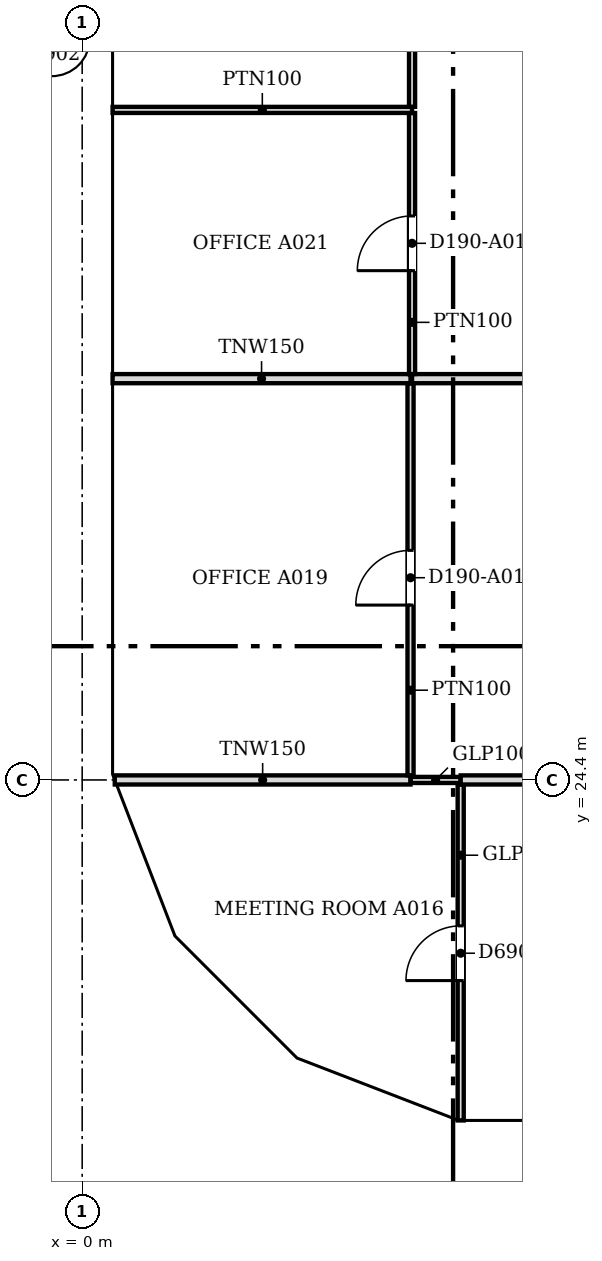
"""IFC4 building model, lengths in metres.
Left out: names, types, materials, properties, quantities, classifications, styles, units other than length and angle.
Written with IfcOpenShell. Run it as: python <this file> out.ifc"""

import sys

from ifc_helpers import new_model, si_unit, direction, frame, frame_2d, origin, place, context, subcontext, project, spatial, polyline, rectangle, outline, extrude, faceted_brep, source, transform, mapped, element, fill, save


model = new_model("IFC4")
c1 = context("Model", 3, precision=1e-05, world=origin(), true_north=direction((0.0, 1.0)))
c2 = subcontext(c1, "Body", "Model", "MODEL_VIEW")
j1 = project(units=[si_unit("LENGTHUNIT", "METRE"), si_unit("PLANEANGLEUNIT", "RADIAN")], contexts=[c1])
p1 = place(None, origin())
s1 = spatial("IfcSite", under=j1, at=p1, CompositionType="ELEMENT")
p2 = place(p1, origin())
s2 = spatial("IfcBuilding", under=s1, at=p2, CompositionType="ELEMENT")
p3 = place(p2, frame((0.0, 0.0, 21.3)))
s3 = spatial("IfcBuildingStorey", under=s2, at=p3, CompositionType="ELEMENT", Elevation=21.3)
m1 = source(origin(), c2, "Body", "Brep", [
    faceted_brep([(3.05, -0.25, 0.0), (6.1, -0.25, 4.5), (6.1, -0.25, 4.5), (3.05, -0.25, 9.0), (0.0, -0.25, 4.5), (0.0, 0.25, 4.5), (3.05, 0.25, 9.0), (6.1, 0.25, 4.5), (6.1, 0.25, 4.5), (3.05, 0.25, 0.0)], [[[0, 1, 2, 3, 4]], [[5, 6, 7, 8, 9]], [[9, 8, 1, 0]], [[7, 6, 3, 2]], [[6, 5, 4, 3]], [[5, 9, 0, 4]], [[1, 8, 7, 2]]]),
])
p4 = place(p3, frame((0.25, 39.65, -4.5), z_axis=(0.0, 0.0, 1.0), x_axis=(0.0, -1.0, 0.0)))
e1 = element("IfcWall", 1, at=p4, inside=s3, PredefinedType="SOLIDWALL", context=c2, shape_type="MappedRepresentation", body=[
    mapped(m1, transform((0.0, 0.0, 0.0), scale=1.0)),
])
m2 = source(origin(), c2, "Body", "SweptSolid", [
    extrude(outline(polyline([(3.05, 0.446), (5.798, 4.5), (3.05, 8.554), (0.302, 4.5), (3.05, 0.446)])), frame((0.0, 0.26, 0.0), z_axis=(0.0, -1.0, 0.0), x_axis=(1.0, 0.0, 0.0)), (0.0, 0.0, 1.0), 0.52),
])
p5 = place(p4, origin())
e2 = element("IfcOpeningElement", 2, at=p5, cuts=e1, PredefinedType="OPENING", context=c2, shape_type="MappedRepresentation", body=[
    mapped(m2, transform((0.0, 0.0, 0.0), scale=1.0)),
])
m3 = source(origin(), c2, "Body", "SweptSolid", [
    extrude(outline(polyline([(3.05, 0.0), (6.1, 4.5), (3.05, 9.0), (0.0, 4.5), (3.05, 0.0)])), frame((0.0, 0.25, 0.0), z_axis=(0.0, -1.0, 0.0), x_axis=(1.0, 0.0, 0.0)), (0.0, 0.0, 1.0), 0.5),
])
p6 = place(p3, frame((0.25, 33.55, -4.5), z_axis=(0.0, 0.0, 1.0), x_axis=(0.0, -1.0, 0.0)))
e3 = element("IfcWall", 3, at=p6, inside=s3, PredefinedType="SOLIDWALL", context=c2, shape_type="MappedRepresentation", body=[
    mapped(m3, transform((0.0, 0.0, 0.0), scale=1.0)),
])
p7 = place(p6, origin())
e4 = element("IfcOpeningElement", 4, at=p7, cuts=e3, PredefinedType="OPENING", context=c2, shape_type="MappedRepresentation", body=[
    mapped(m2, transform((0.0, 0.0, 0.0), scale=1.0)),
])
m4 = source(origin(), c2, "Body", "Brep", [
    faceted_brep([(3.003, -0.25, 0.0), (3.05, -0.25, 0.071), (3.05, -0.25, 8.929), (3.003, -0.25, 9.0), (0.0, -0.25, 4.5), (0.0, 0.25, 4.5), (2.957, 0.25, 8.93), (2.957, 0.25, 0.07), (3.003, 0.0, 0.0), (3.003, 0.0, 9.0)], [[[0, 1, 2, 3, 4]], [[5, 6, 7]], [[1, 0, 8]], [[9, 3, 2]], [[6, 5, 4, 3, 9]], [[5, 7, 8, 0, 4]], [[1, 8, 7, 6, 9, 2]]]),
])
p8 = place(p3, frame((0.25, 27.45, -4.5), z_axis=(0.0, 0.0, 1.0), x_axis=(0.0, -1.0, 0.0)))
e5 = element("IfcWall", 5, at=p8, inside=s3, PredefinedType="SOLIDWALL", context=c2, shape_type="MappedRepresentation", body=[
    mapped(m4, transform((0.0, 0.0, 0.0), scale=1.0)),
])
m5 = source(origin(), c2, "Body", "SweptSolid", [
    extrude(outline(polyline([(2.803, 8.25), (0.301, 4.5), (2.803, 0.75), (2.803, 8.25)])), frame((0.0, 0.26, 0.0), z_axis=(0.0, -1.0, 0.0), x_axis=(1.0, 0.0, 0.0)), (0.0, 0.0, 1.0), 0.52),
])
p9 = place(p8, origin())
e6 = element("IfcOpeningElement", 6, at=p9, cuts=e5, PredefinedType="OPENING", context=c2, shape_type="MappedRepresentation", body=[
    mapped(m5, transform((0.0, 0.0, 0.0), scale=1.0)),
])
m6 = source(origin(), c2, "Body", "Brep", [
    faceted_brep([(0.047, -0.25, 0.0), (2.997, -0.25, 4.5), (0.047, -0.25, 9.0), (0.0, -0.25, 8.93), (0.0, -0.25, 0.07), (0.093, 0.25, 8.929), (2.944, 0.25, 4.581), (2.944, 0.25, 4.419), (0.093, 0.25, 0.071), (2.997, 0.0, 4.5), (0.047, 0.0, 0.0), (0.047, 0.0, 9.0)], [[[0, 1, 2, 3, 4]], [[5, 6, 7, 8]], [[8, 7, 9, 1, 0, 10]], [[6, 5, 11, 2, 1, 9]], [[3, 2, 11]], [[10, 0, 4]], [[8, 10, 4, 3, 11, 5]], [[9, 7, 6]]]),
])
p10 = place(p3, frame((0.233, 24.49, -4.5), z_axis=(0.0, 0.0, 1.0), x_axis=(0.359901446078, -0.932990326376, 0.0)))
e7 = element("IfcWall", 7, at=p10, inside=s3, PredefinedType="SOLIDWALL", context=c2, shape_type="MappedRepresentation", body=[
    mapped(m6, transform((0.0, 0.0, 0.0), scale=1.0)),
])
m7 = source(origin(), c2, "Body", "SweptSolid", [
    extrude(outline(polyline([(0.247, 0.761), (2.698, 4.5), (0.247, 8.239), (0.247, 0.761)])), frame((0.0, 0.26, 0.0), z_axis=(0.0, -1.0, 0.0), x_axis=(1.0, 0.0, 0.0)), (0.0, 0.0, 1.0), 0.52),
])
p11 = place(p10, origin())
e8 = element("IfcOpeningElement", 8, at=p11, cuts=e7, PredefinedType="OPENING", context=c2, shape_type="MappedRepresentation", body=[
    mapped(m7, transform((0.0, 0.0, 0.0), scale=1.0)),
])
m8 = source(origin(), c2, "Body", "Brep", [
    faceted_brep([(2.944, -0.25, 0.0), (2.997, -0.25, 0.081), (2.997, -0.25, 8.919), (2.944, -0.25, 9.0), (0.0, -0.25, 4.5), (0.053, 0.25, 4.581), (2.891, 0.25, 8.919), (2.891, 0.25, 0.081), (0.053, 0.25, 4.419), (2.944, 0.0, 0.0), (2.944, 0.0, 9.0), (0.0, 0.0, 4.5)], [[[0, 1, 2, 3, 4]], [[5, 6, 7, 8]], [[1, 0, 9]], [[10, 3, 2]], [[6, 5, 11, 4, 3, 10]], [[8, 7, 9, 0, 4, 11]], [[8, 11, 5]], [[1, 9, 7, 6, 10, 2]]]),
])
p12 = place(p3, frame((1.312, 21.694, -4.5), z_axis=(0.0, 0.0, 1.0), x_axis=(0.707066050402, -0.707147509625, 0.0)))
e9 = element("IfcWall", 9, at=p12, inside=s3, PredefinedType="SOLIDWALL", context=c2, shape_type="MappedRepresentation", body=[
    mapped(m8, transform((0.0, 0.0, 0.0), scale=1.0)),
])
m9 = source(origin(), c2, "Body", "SweptSolid", [
    extrude(outline(polyline([(2.744, 8.238), (0.299, 4.5), (2.744, 0.762), (2.744, 8.238)])), frame((0.0, 0.26, 0.0), z_axis=(0.0, -1.0, 0.0), x_axis=(1.0, 0.0, 0.0)), (0.0, 0.0, 1.0), 0.52),
])
p13 = place(p12, origin())
e10 = element("IfcOpeningElement", 10, at=p13, cuts=e9, PredefinedType="OPENING", context=c2, shape_type="MappedRepresentation", body=[
    mapped(m9, transform((0.0, 0.0, 0.0), scale=1.0)),
])
m10 = source(origin(), c2, "Body", "Brep", [
    faceted_brep([(0.053, -0.25, 0.0), (3.003, -0.25, 4.5), (0.053, -0.25, 9.0), (0.0, -0.25, 8.919), (0.0, -0.25, 0.081), (0.106, 0.25, 8.919), (2.957, 0.25, 4.571), (2.957, 0.25, 4.429), (0.106, 0.25, 0.081), (3.003, 0.0, 4.5), (0.053, 0.0, 0.0), (0.053, 0.0, 9.0)], [[[0, 1, 2, 3, 4]], [[5, 6, 7, 8]], [[8, 7, 9, 1, 0, 10]], [[6, 5, 11, 2, 1, 9]], [[3, 2, 11]], [[10, 0, 4]], [[8, 10, 4, 3, 11, 5]], [[9, 7, 6]]]),
])
p14 = place(p3, frame((3.344, 19.631, -4.5), z_axis=(0.0, 0.0, 1.0), x_axis=(0.933007896601, -0.359855894603, 0.0)))
e11 = element("IfcWall", 11, at=p14, inside=s3, PredefinedType="SOLIDWALL", context=c2, shape_type="MappedRepresentation", body=[
    mapped(m10, transform((0.0, 0.0, 0.0), scale=1.0)),
])
m11 = source(origin(), c2, "Body", "SweptSolid", [
    extrude(outline(polyline([(0.253, 0.761), (2.705, 4.5), (0.253, 8.239), (0.253, 0.761)])), frame((0.0, 0.26, 0.0), z_axis=(0.0, -1.0, 0.0), x_axis=(1.0, 0.0, 0.0)), (0.0, 0.0, 1.0), 0.52),
])
p15 = place(p14, origin())
e12 = element("IfcOpeningElement", 12, at=p15, cuts=e11, PredefinedType="OPENING", context=c2, shape_type="MappedRepresentation", body=[
    mapped(m11, transform((0.0, 0.0, 0.0), scale=1.0)),
])
m12 = source(origin(), c2, "Body", "Brep", [
    faceted_brep([(3.003, -0.25, 0.0), (6.053, -0.25, 4.5), (3.003, -0.25, 9.0), (0.0, -0.25, 4.5), (0.047, 0.25, 4.57), (3.003, 0.25, 9.0), (6.053, 0.25, 4.5), (3.003, 0.25, 0.0), (0.047, 0.25, 4.43), (0.0, 0.0, 4.5)], [[[0, 1, 2, 3]], [[4, 5, 6, 7, 8]], [[7, 6, 1, 0]], [[6, 5, 2, 1]], [[5, 4, 9, 3, 2]], [[8, 7, 0, 3, 9]], [[8, 9, 4]]]),
])
p16 = place(p3, frame((6.146, 18.55, -4.5), z_axis=(0.0, 0.0, 1.0), x_axis=(1.0, 0.0, 0.0)))
e13 = element("IfcWall", 13, at=p16, inside=s3, PredefinedType="SOLIDWALL", context=c2, shape_type="MappedRepresentation", body=[
    mapped(m12, transform((0.0, 0.0, 0.0), scale=1.0)),
])
m13 = source(origin(), c2, "Body", "SweptSolid", [
    extrude(outline(polyline([(3.005, 0.448), (5.751, 4.5), (3.005, 8.552), (0.301, 4.5), (3.005, 0.448)])), frame((0.0, 0.26, 0.0), z_axis=(0.0, -1.0, 0.0), x_axis=(1.0, 0.0, 0.0)), (0.0, 0.0, 1.0), 0.52),
])
p17 = place(p16, origin())
e14 = element("IfcOpeningElement", 14, at=p17, cuts=e13, PredefinedType="OPENING", context=c2, shape_type="MappedRepresentation", body=[
    mapped(m13, transform((0.0, 0.0, 0.0), scale=1.0)),
])
m14 = source(origin(), c2, "Body", "SweptSolid", [
    extrude(outline(polyline([(3.05, 0.0), (6.1, 4.5), (0.0, 4.5), (3.05, 0.0)])), frame((0.0, 0.25, 0.0), z_axis=(0.0, -1.0, 0.0), x_axis=(1.0, 0.0, 0.0)), (0.0, 0.0, 1.0), 0.5),
])
p18 = place(p3, frame((0.25, 36.6, 0.0), z_axis=(0.0, 0.0, 1.0), x_axis=(0.0, -1.0, 0.0)))
e15 = element("IfcWall", 15, at=p18, inside=s3, PredefinedType="SOLIDWALL", context=c2, shape_type="MappedRepresentation", body=[
    mapped(m14, transform((0.0, 0.0, 0.0), scale=1.0)),
])
m15 = source(origin(), c2, "Body", "SweptSolid", [
    extrude(outline(polyline([(3.05, 0.446), (5.629, 4.25), (0.471, 4.25), (3.05, 0.446)])), frame((0.0, 0.26, 0.0), z_axis=(0.0, -1.0, 0.0), x_axis=(1.0, 0.0, 0.0)), (0.0, 0.0, 1.0), 0.52),
])
p19 = place(p18, origin())
e16 = element("IfcOpeningElement", 16, at=p19, cuts=e15, PredefinedType="OPENING", context=c2, shape_type="MappedRepresentation", body=[
    mapped(m15, transform((0.0, 0.0, 0.0), scale=1.0)),
])
m16 = source(origin(), c2, "Body", "Brep", [
    faceted_brep([(3.05, -0.25, 0.0), (6.053, -0.25, 4.5), (0.0, -0.25, 4.5), (0.0, 0.25, 4.5), (6.007, 0.25, 4.5), (6.007, 0.25, 4.43), (3.05, 0.25, 0.0), (6.053, 0.0, 4.5)], [[[0, 1, 2]], [[3, 4, 5, 6]], [[6, 5, 7, 1, 0]], [[4, 3, 2, 1, 7]], [[3, 6, 0, 2]], [[5, 4, 7]]]),
])
p20 = place(p3, frame((0.25, 30.5, 0.0), z_axis=(0.0, 0.0, 1.0), x_axis=(0.0, -1.0, 0.0)))
e17 = element("IfcWall", 17, at=p20, inside=s3, PredefinedType="SOLIDWALL", context=c2, shape_type="MappedRepresentation", body=[
    mapped(m16, transform((0.0, 0.0, 0.0), scale=1.0)),
])
m17 = source(origin(), c2, "Body", "SweptSolid", [
    extrude(outline(polyline([(3.048, 0.448), (5.586, 4.25), (0.471, 4.25), (3.048, 0.448)])), frame((0.0, 0.26, 0.0), z_axis=(0.0, -1.0, 0.0), x_axis=(1.0, 0.0, 0.0)), (0.0, 0.0, 1.0), 0.52),
])
p21 = place(p20, origin())
e18 = element("IfcOpeningElement", 18, at=p21, cuts=e17, PredefinedType="OPENING", context=c2, shape_type="MappedRepresentation", body=[
    mapped(m17, transform((0.0, 0.0, 0.0), scale=1.0)),
])
m18 = source(origin(), c2, "Body", "Brep", [
    faceted_brep([(2.95, -0.25, 0.0), (3.003, -0.25, 0.081), (3.003, -0.25, 4.5), (0.0, -0.25, 4.5), (0.047, 0.25, 4.5), (2.898, 0.25, 4.5), (2.898, 0.25, 0.081), (0.047, 0.25, 4.429), (2.95, 0.0, 0.0), (0.0, 0.0, 4.5)], [[[0, 1, 2, 3]], [[4, 5, 6, 7]], [[1, 0, 8]], [[5, 4, 9, 3, 2]], [[7, 6, 8, 0, 3, 9]], [[7, 9, 4]], [[1, 8, 6, 5, 2]]]),
])
p22 = place(p3, frame((0.25, 24.447, 0.0), z_axis=(0.0, 0.0, 1.0), x_axis=(0.35992665181, -0.932980602862, 0.0)))
e19 = element("IfcWall", 19, at=p22, inside=s3, PredefinedType="SOLIDWALL", context=c2, shape_type="MappedRepresentation", body=[
    mapped(m18, transform((0.0, 0.0, 0.0), scale=1.0)),
])
m19 = source(origin(), c2, "Body", "SweptSolid", [
    extrude(outline(polyline([(2.75, 4.25), (0.463, 4.25), (2.75, 0.761), (2.75, 4.25)])), frame((0.0, 0.26, 0.0), z_axis=(0.0, -1.0, 0.0), x_axis=(1.0, 0.0, 0.0)), (0.0, 0.0, 1.0), 0.52),
])
p23 = place(p22, origin())
e20 = element("IfcOpeningElement", 20, at=p23, cuts=e19, PredefinedType="OPENING", context=c2, shape_type="MappedRepresentation", body=[
    mapped(m19, transform((0.0, 0.0, 0.0), scale=1.0)),
])
m20 = source(origin(), c2, "Body", "Brep", [
    faceted_brep([(0.053, -0.25, 0.0), (2.997, -0.25, 4.5), (0.0, -0.25, 4.5), (0.0, -0.25, 0.081), (0.106, 0.25, 4.5), (2.944, 0.25, 4.5), (2.944, 0.25, 4.419), (0.106, 0.25, 0.081), (2.997, 0.0, 4.5), (0.053, 0.0, 0.0)], [[[0, 1, 2, 3]], [[4, 5, 6, 7]], [[7, 6, 8, 1, 0, 9]], [[5, 4, 2, 1, 8]], [[9, 0, 3]], [[7, 9, 3, 2, 4]], [[6, 5, 8]]]),
])
p24 = place(p3, frame((1.274, 21.731, 0.0), z_axis=(0.0, 0.0, 1.0), x_axis=(0.707147509625, -0.707066050402, 0.0)))
e21 = element("IfcWall", 21, at=p24, inside=s3, PredefinedType="SOLIDWALL", context=c2, shape_type="MappedRepresentation", body=[
    mapped(m20, transform((0.0, 0.0, 0.0), scale=1.0)),
])
m21 = source(origin(), c2, "Body", "SweptSolid", [
    extrude(outline(polyline([(0.253, 0.762), (2.535, 4.25), (0.253, 4.25), (0.253, 0.762)])), frame((0.0, 0.26, 0.0), z_axis=(0.0, -1.0, 0.0), x_axis=(1.0, 0.0, 0.0)), (0.0, 0.0, 1.0), 0.52),
])
p25 = place(p24, origin())
e22 = element("IfcOpeningElement", 22, at=p25, cuts=e21, PredefinedType="OPENING", context=c2, shape_type="MappedRepresentation", body=[
    mapped(m21, transform((0.0, 0.0, 0.0), scale=1.0)),
])
m22 = source(origin(), c2, "Body", "Brep", [
    faceted_brep([(2.95, -0.25, 0.0), (2.997, -0.25, 0.07), (2.997, -0.25, 4.5), (0.0, -0.25, 4.5), (0.053, 0.25, 4.5), (2.904, 0.25, 4.5), (2.904, 0.25, 0.071), (0.053, 0.25, 4.419), (2.95, 0.0, 0.0), (0.0, 0.0, 4.5)], [[[0, 1, 2, 3]], [[4, 5, 6, 7]], [[1, 0, 8]], [[5, 4, 9, 3, 2]], [[7, 6, 8, 0, 3, 9]], [[7, 9, 4]], [[1, 8, 6, 5, 2]]]),
])
p26 = place(p3, frame((3.394, 19.612, 0.0), z_axis=(0.0, 0.0, 1.0), x_axis=(0.932990326376, -0.359901446078, 0.0)))
e23 = element("IfcWall", 23, at=p26, inside=s3, PredefinedType="SOLIDWALL", context=c2, shape_type="MappedRepresentation", body=[
    mapped(m22, transform((0.0, 0.0, 0.0), scale=1.0)),
])
p27 = place(p26, origin())
e24 = element("IfcOpeningElement", 24, at=p27, cuts=e23, PredefinedType="OPENING", context=c2, shape_type="MappedRepresentation", body=[
    mapped(m19, transform((0.0, 0.0, 0.0), scale=1.0)),
])
m23 = source(origin(), c2, "Body", "Brep", [
    faceted_brep([(0.047, -0.25, 0.0), (3.05, -0.25, 4.5), (0.0, -0.25, 4.5), (0.0, -0.25, 0.071), (0.093, 0.25, 4.5), (3.05, 0.25, 4.5), (0.093, 0.25, 0.07), (0.047, 0.0, 0.0)], [[[0, 1, 2, 3]], [[4, 5, 6]], [[6, 5, 1, 0, 7]], [[5, 4, 2, 1]], [[7, 0, 3]], [[6, 7, 3, 2, 4]]]),
])
p28 = place(p3, frame((6.1, 18.55, 0.0), z_axis=(0.0, 0.0, 1.0), x_axis=(1.0, 0.0, 0.0)))
e25 = element("IfcWall", 25, at=p28, inside=s3, PredefinedType="SOLIDWALL", context=c2, shape_type="MappedRepresentation", body=[
    mapped(m23, transform((0.0, 0.0, 0.0), scale=1.0)),
])
m24 = source(origin(), c2, "Body", "SweptSolid", [
    extrude(outline(polyline([(0.247, 0.75), (2.583, 4.25), (0.247, 4.25), (0.247, 0.75)])), frame((0.0, 0.26, 0.0), z_axis=(0.0, -1.0, 0.0), x_axis=(1.0, 0.0, 0.0)), (0.0, 0.0, 1.0), 0.52),
])
p29 = place(p28, origin())
e26 = element("IfcOpeningElement", 26, at=p29, cuts=e25, PredefinedType="OPENING", context=c2, shape_type="MappedRepresentation", body=[
    mapped(m24, transform((0.0, 0.0, 0.0), scale=1.0)),
])
p30 = place(p3, frame((6.225, 18.8, 0.0), z_axis=(0.0, 0.0, 1.0), x_axis=(0.0, 1.0, 0.0)))
e27 = element("IfcWall", 27, at=p30, inside=s3, PredefinedType="PARTITIONING", context=c2, shape_type="SweptSolid", body=[
    extrude(rectangle(XDim=5.524, YDim=0.1, at=frame_2d((2.762, 0.0))), origin(), (0.0, 0.0, 1.0), 3.767),
])
m25 = source(origin(), c2, "Body", "SweptSolid", [
    extrude(rectangle(XDim=0.9, YDim=2.1, at=frame_2d((0.45, 1.05))), frame((0.0, 0.06, 0.0), z_axis=(0.0, -1.0, 0.0), x_axis=(1.0, 0.0, 0.0)), (0.0, 0.0, 1.0), 0.12),
])
p31 = place(p30, frame((2.3, 0.0, 0.0)))
e28 = element("IfcOpeningElement", 28, at=p31, cuts=e27, PredefinedType="OPENING", context=c2, shape_type="MappedRepresentation", body=[
    mapped(m25, transform((0.0, 0.0, 0.0), scale=1.0)),
])
p32 = place(p3, frame((0.536, 24.4, 0.0), z_axis=(0.0, 0.0, 1.0), x_axis=(1.0, 0.0, 0.0)))
e29 = element("IfcWall", 29, at=p32, inside=s3, PredefinedType="PARTITIONING", context=c2, shape_type="SweptSolid", body=[
    extrude(rectangle(XDim=4.864, YDim=0.15, at=frame_2d((2.432, 0.0))), origin(), (0.0, 0.0, 1.0), 3.767),
])
p33 = place(p3, frame((5.401, 24.4, 0.0), z_axis=(0.0, 0.0, 1.0), x_axis=(1.0, 0.0, 0.0)))
e30 = element("IfcWall", 30, at=p33, inside=s3, PredefinedType="PARTITIONING", context=c2, shape_type="SweptSolid", body=[
    extrude(rectangle(XDim=0.823, YDim=0.1, at=frame_2d((0.412, 0.0))), origin(), (0.0, 0.0, 1.0), 3.767),
])
p34 = place(p3, frame((6.225, 24.4, 0.0), z_axis=(0.0, 0.0, 1.0), x_axis=(1.0, 0.0, 0.0)))
e31 = element("IfcWall", 31, at=p34, inside=s3, PredefinedType="PARTITIONING", context=c2, shape_type="SweptSolid", body=[
    extrude(rectangle(XDim=5.424, YDim=0.15, at=frame_2d((2.712, 0.0))), origin(), (0.0, 0.0, 1.0), 3.767),
])
p35 = place(p3, frame((5.4, 24.476, 0.0), z_axis=(0.0, 0.0, 1.0), x_axis=(0.0, 1.0, 0.0)))
e32 = element("IfcWall", 32, at=p35, inside=s3, PredefinedType="PARTITIONING", context=c2, shape_type="SweptSolid", body=[
    extrude(rectangle(XDim=6.448, YDim=0.1, at=frame_2d((3.224, 0.0))), origin(), (0.0, 0.0, 1.0), 3.767),
])
p36 = place(p35, frame((2.8, 0.0, 0.0)))
e33 = element("IfcOpeningElement", 33, at=p36, cuts=e32, PredefinedType="OPENING", context=c2, shape_type="MappedRepresentation", body=[
    mapped(m25, transform((0.0, 0.0, 0.0), scale=1.0)),
])
p37 = place(p3, frame((0.5, 31.0, 0.0), z_axis=(0.0, 0.0, 1.0), x_axis=(1.0, 0.0, 0.0)))
e34 = element("IfcWall", 34, at=p37, inside=s3, PredefinedType="PARTITIONING", context=c2, shape_type="SweptSolid", body=[
    extrude(rectangle(XDim=4.9, YDim=0.15, at=frame_2d((2.45, 0.0))), origin(), (0.0, 0.0, 1.0), 3.767),
])
p38 = place(p3, frame((5.425, 31.0, 0.0), z_axis=(0.0, 0.0, 1.0), x_axis=(1.0, 0.0, 0.0)))
e35 = element("IfcWall", 35, at=p38, inside=s3, PredefinedType="PARTITIONING", context=c2, shape_type="SweptSolid", body=[
    extrude(rectangle(XDim=22.599, YDim=0.15, at=frame_2d((11.299, 0.0))), origin(), (0.0, 0.0, 1.0), 3.767),
])
p39 = place(p3, frame((5.425, 31.076, 0.0), z_axis=(0.0, 0.0, 1.0), x_axis=(0.0, 1.0, 0.0)))
e36 = element("IfcWall", 36, at=p39, inside=s3, PredefinedType="PARTITIONING", context=c2, shape_type="SweptSolid", body=[
    extrude(rectangle(XDim=4.293, YDim=0.1, at=frame_2d((2.147, 0.0))), origin(), (0.0, 0.0, 1.0), 3.767),
])
p40 = place(p39, frame((1.7, 0.0, 0.0)))
e37 = element("IfcOpeningElement", 37, at=p40, cuts=e36, PredefinedType="OPENING", context=c2, shape_type="MappedRepresentation", body=[
    mapped(m25, transform((0.0, 0.0, 0.0), scale=1.0)),
])
p41 = place(p3, frame((0.5, 35.42, 0.0), z_axis=(0.0, 0.0, 1.0), x_axis=(1.0, 0.0, 0.0)))
e38 = element("IfcWall", 38, at=p41, inside=s3, PredefinedType="PARTITIONING", context=c2, shape_type="SweptSolid", body=[
    extrude(rectangle(XDim=4.925, YDim=0.1, at=frame_2d((2.462, 0.0))), origin(), (0.0, 0.0, 1.0), 3.767),
])
p42 = place(p3, frame((5.425, 35.471, 0.0), z_axis=(0.0, 0.0, 1.0), x_axis=(0.0, 1.0, 0.0)))
e39 = element("IfcWall", 39, at=p42, inside=s3, PredefinedType="PARTITIONING", context=c2, shape_type="SweptSolid", body=[
    extrude(rectangle(XDim=3.529, YDim=0.1, at=frame_2d((1.764, 0.0))), origin(), (0.0, 0.0, 1.0), 3.767),
])
p43 = place(p42, frame((1.3, 0.0, 0.0)))
e40 = element("IfcOpeningElement", 40, at=p43, cuts=e39, PredefinedType="OPENING", context=c2, shape_type="MappedRepresentation", body=[
    mapped(m25, transform((0.0, 0.0, 0.0), scale=1.0)),
])
m26 = source(origin(), c2, "Body", "SweptSolid", [
    extrude(rectangle(XDim=0.9, YDim=2.1, at=frame_2d((0.45, 1.05))), frame((0.0, 0.025, 0.0), z_axis=(0.0, -1.0, 0.0), x_axis=(1.0, 0.0, 0.0)), (0.0, 0.0, 1.0), 0.05),
])
p44 = place(p40, origin())
e41 = element("IfcDoor", 41, at=p44, inside=s3, OperationType="SINGLE_SWING_LEFT", PredefinedType="DOOR", context=c2, shape_type="MappedRepresentation", body=[
    mapped(m26, transform((0.0, 0.0, 0.0), scale=1.0)),
])
fill(e37, e41)
p45 = place(p31, origin())
e42 = element("IfcDoor", 42, at=p45, inside=s3, OperationType="SINGLE_SWING_LEFT", PredefinedType="DOOR", context=c2, shape_type="MappedRepresentation", body=[
    mapped(m26, transform((0.0, 0.0, 0.0), scale=1.0)),
])
fill(e28, e42)
p46 = place(p36, origin())
e43 = element("IfcDoor", 43, at=p46, inside=s3, OperationType="SINGLE_SWING_LEFT", PredefinedType="DOOR", context=c2, shape_type="MappedRepresentation", body=[
    mapped(m26, transform((0.0, 0.0, 0.0), scale=1.0)),
])
fill(e33, e43)
save(model, sys.argv[1])
